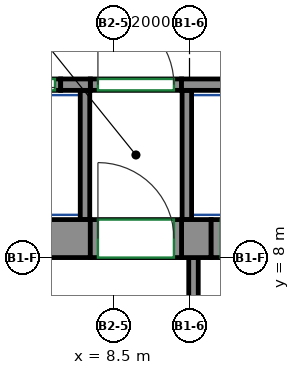
"""IFC4 building model, lengths in metres.
Left out: names, types, materials, properties, quantities, classifications, styles, units other than length and angle.
Written with IfcOpenShell. Run it as: python <this file> out.ifc"""

import sys

from ifc_helpers import new_model, si_unit, direction, frame, frame_2d, origin, place, context, subcontext, project, spatial, rectangle, extrude, source, transform, mapped, element, fill, save


model = new_model("IFC4")
c1 = context("Model", 3, precision=1e-05, world=origin(), true_north=direction((0.0, 1.0)))
c2 = subcontext(c1, "Body", "Model", "MODEL_VIEW")
j1 = project(units=[si_unit("LENGTHUNIT", "METRE"), si_unit("PLANEANGLEUNIT", "RADIAN")], contexts=[c1])
p1 = place(None, origin())
s1 = spatial("IfcSite", under=j1, at=p1, CompositionType="ELEMENT")
p2 = place(p1, origin())
s2 = spatial("IfcBuilding", under=s1, at=p2, CompositionType="ELEMENT")
p3 = place(p2, frame((0.0, 0.0, 51.0)))
s3 = spatial("IfcBuildingStorey", under=s2, at=p3, CompositionType="ELEMENT", Elevation=51.0)
m1 = source(origin(), c2, "Body", "SweptSolid", [
    extrude(rectangle(XDim=14.18, YDim=1.0, at=frame_2d((7.09, 0.0))), origin(), (0.0, 0.0, 1.0), 3.72),
])
p4 = place(p3, frame((-6.29, 8.5, 0.0), z_axis=(0.0, 0.0, 1.0), x_axis=(1.0, 0.0, 0.0)))
e1 = element("IfcWall", 1, at=p4, inside=s3, PredefinedType="SHEAR", context=c2, shape_type="MappedRepresentation", body=[
    mapped(m1, transform((0.0, 0.0, 0.0))),
])
m2 = source(origin(), c2, "Body", "SweptSolid", [
    extrude(rectangle(XDim=0.78, YDim=1.0, at=frame_2d((0.39, 0.0))), origin(), (0.0, 0.0, 1.0), 3.72),
])
p5 = place(p3, frame((10.29, 8.5, 0.0), z_axis=(0.0, 0.0, 1.0), x_axis=(1.0, 0.0, 0.0)))
e2 = element("IfcWall", 2, at=p5, inside=s3, PredefinedType="SHEAR", context=c2, shape_type="MappedRepresentation", body=[
    mapped(m2, transform((0.0, 0.0, 0.0))),
])
m3 = source(origin(), c2, "Body", "SweptSolid", [
    extrude(rectangle(XDim=0.78, YDim=0.3, at=frame_2d((0.39, 0.0))), origin(), (0.0, 0.0, 1.0), 3.72),
])
p6 = place(p3, frame((7.11, 12.55, 0.0), z_axis=(0.0, 0.0, 1.0), x_axis=(1.0, 0.0, 0.0)))
e3 = element("IfcWall", 3, at=p6, inside=s3, PredefinedType="SHEAR", context=c2, shape_type="MappedRepresentation", body=[
    mapped(m3, transform((0.0, 0.0, 0.0))),
])
m4 = source(origin(), c2, "Body", "SweptSolid", [
    extrude(rectangle(XDim=2.82, YDim=0.3, at=frame_2d((1.41, 0.0))), origin(), (0.0, 0.0, 1.0), 3.72),
])
p7 = place(p3, frame((10.29, 12.55, 0.0), z_axis=(0.0, 0.0, 1.0), x_axis=(1.0, 0.0, 0.0)))
e4 = element("IfcWall", 4, at=p7, inside=s3, PredefinedType="SHEAR", context=c2, shape_type="MappedRepresentation", body=[
    mapped(m4, transform((0.0, 0.0, 0.0))),
])
m5 = source(origin(), c2, "Body", "SweptSolid", [
    extrude(rectangle(XDim=1.4, YDim=0.3, at=frame_2d((0.7, 0.0))), origin(), (0.0, 0.0, 1.0), 3.72),
])
p8 = place(p3, frame((5.71, 12.55, 0.0), z_axis=(0.0, 0.0, 1.0), x_axis=(1.0, 0.0, 0.0)))
e5 = element("IfcWall", 5, at=p8, inside=s3, PredefinedType="PARTITIONING", context=c2, shape_type="MappedRepresentation", body=[
    mapped(m5, transform((0.0, 0.0, 0.0))),
])
p9 = place(p8, frame((0.15, 0.0, 0.0)))
e6 = element("IfcOpeningElement", 6, at=p9, cuts=e5, PredefinedType="OPENING", context=c2, shape_type="SweptSolid", body=[
    extrude(rectangle(XDim=1.1, YDim=2.1, at=frame_2d((0.55, 1.05))), frame((0.0, 0.16, 0.0), z_axis=(0.0, -1.0, 0.0), x_axis=(1.0, 0.0, 0.0)), (0.0, 0.0, 1.0), 0.32),
])
m6 = source(origin(), c2, "Body", "SweptSolid", [
    extrude(rectangle(XDim=2.4, YDim=0.3, at=frame_2d((1.2, 0.0))), origin(), (0.0, 0.0, 1.0), 3.72),
])
p10 = place(p3, frame((7.89, 12.55, 0.0), z_axis=(0.0, 0.0, 1.0), x_axis=(1.0, 0.0, 0.0)))
e7 = element("IfcWall", 7, at=p10, inside=s3, PredefinedType="PARTITIONING", context=c2, shape_type="MappedRepresentation", body=[
    mapped(m6, transform((0.0, 0.0, 0.0))),
])
p11 = place(p10, frame((0.2, 0.0, 0.0)))
e8 = element("IfcOpeningElement", 8, at=p11, cuts=e7, PredefinedType="OPENING", context=c2, shape_type="SweptSolid", body=[
    extrude(rectangle(XDim=2.0, YDim=2.1, at=frame_2d((1.0, 1.05))), frame((0.0, 0.16, 0.0), z_axis=(0.0, -1.0, 0.0), x_axis=(1.0, 0.0, 0.0)), (0.0, 0.0, 1.0), 0.32),
])
m7 = source(origin(), c2, "Body", "SweptSolid", [
    extrude(rectangle(XDim=2.65, YDim=0.25, at=frame_2d((1.325, 0.0))), origin(), (0.0, 0.0, 1.0), 3.72),
])
p12 = place(p3, frame((10.605, 5.35, 0.0), z_axis=(0.0, 0.0, 1.0), x_axis=(0.0, 1.0, 0.0)))
e9 = element("IfcWall", 9, at=p12, inside=s3, PredefinedType="PARTITIONING", context=c2, shape_type="MappedRepresentation", body=[
    mapped(m7, transform((0.0, 0.0, 0.0))),
])
m8 = source(origin(), c2, "Body", "SweptSolid", [
    extrude(rectangle(XDim=3.4, YDim=0.25, at=frame_2d((1.7, 0.0))), origin(), (0.0, 0.0, 1.0), 3.72),
])
for number, where, z_axis, x_axis in (
    (10, (10.43, 9.0, 0.0), (0.0, 0.0, 1.0), (0.0, 1.0, 0.0)),
    (11, (7.75, 9.0, 0.0), (0.0, 0.0, 1.0), (0.0, 1.0, 0.0)),
):
    element("IfcWall", number, at=place(p3, frame(where, z_axis=z_axis, x_axis=x_axis)), inside=s3, PredefinedType="PARTITIONING", context=c2, shape_type="MappedRepresentation", body=[
        mapped(m8, transform((0.0, 0.0, 0.0))),
    ])
m9 = source(origin(), c2, "Body", "SweptSolid", [
    extrude(rectangle(XDim=2.4, YDim=1.0, at=frame_2d((1.2, 0.0))), origin(), (0.0, 0.0, 1.0), 2.7),
])
p13 = place(p3, frame((7.89, 8.5, 0.0), z_axis=(0.0, 0.0, 1.0), x_axis=(1.0, 0.0, 0.0)))
e12 = element("IfcWall", 12, at=p13, inside=s3, PredefinedType="PARTITIONING", context=c2, shape_type="MappedRepresentation", body=[
    mapped(m9, transform((0.0, 0.0, 0.0))),
])
p14 = place(p13, frame((0.2, 0.0, 0.0)))
e13 = element("IfcOpeningElement", 13, at=p14, cuts=e12, PredefinedType="OPENING", context=c2, shape_type="SweptSolid", body=[
    extrude(rectangle(XDim=2.0, YDim=2.1, at=frame_2d((1.0, 1.05))), frame((0.0, 0.51, 0.0), z_axis=(0.0, -1.0, 0.0), x_axis=(1.0, 0.0, 0.0)), (0.0, 0.0, 1.0), 1.02),
])
m10 = source(origin(), c2, "Body", "SweptSolid", [
    extrude(rectangle(XDim=1.4, YDim=1.0, at=frame_2d((0.7, 0.0))), origin(), (0.0, 0.0, 1.0), 2.7),
])
p15 = place(p3, frame((11.07, 8.5, 0.0), z_axis=(0.0, 0.0, 1.0), x_axis=(1.0, 0.0, 0.0)))
e14 = element("IfcWall", 14, at=p15, inside=s3, PredefinedType="PARTITIONING", context=c2, shape_type="MappedRepresentation", body=[
    mapped(m10, transform((0.0, 0.0, 0.0))),
])
p16 = place(p15, frame((0.25, 0.0, 0.0)))
e15 = element("IfcOpeningElement", 15, at=p16, cuts=e14, PredefinedType="OPENING", context=c2, shape_type="SweptSolid", body=[
    extrude(rectangle(XDim=0.9, YDim=2.1, at=frame_2d((0.45, 1.05))), frame((0.0, 0.51, 0.0), z_axis=(0.0, -1.0, 0.0), x_axis=(1.0, 0.0, 0.0)), (0.0, 0.0, 1.0), 1.02),
])
p17 = place(p11, origin())
e16 = element("IfcDoor", 16, at=p17, inside=s3, OperationType="DOUBLE_DOOR_SINGLE_SWING", PredefinedType="DOOR", context=c2, shape_type="SweptSolid", body=[
    extrude(rectangle(XDim=2.0, YDim=2.1, at=frame_2d((1.0, 1.05))), frame((0.0, 0.025, 0.0), z_axis=(0.0, -1.0, 0.0), x_axis=(1.0, 0.0, 0.0)), (0.0, 0.0, 1.0), 0.05),
])
fill(e8, e16)
p18 = place(p14, origin())
e17 = element("IfcDoor", 17, at=p18, inside=s3, OperationType="DOUBLE_DOOR_SINGLE_SWING", PredefinedType="DOOR", context=c2, shape_type="SweptSolid", body=[
    extrude(rectangle(XDim=2.0, YDim=2.1, at=frame_2d((1.0, 1.05))), frame((0.0, 0.405, 0.0), z_axis=(0.0, -1.0, 0.0), x_axis=(1.0, 0.0, 0.0)), (0.0, 0.0, 1.0), 0.05),
])
fill(e13, e17)
p19 = place(p9, origin())
e18 = element("IfcDoor", 18, at=p19, inside=s3, OperationType="DOUBLE_DOOR_SLIDING", PredefinedType="DOOR", context=c2, shape_type="SweptSolid", body=[
    extrude(rectangle(XDim=1.1, YDim=2.1, at=frame_2d((0.55, 1.05))), frame((0.0, 0.025, 0.0), z_axis=(0.0, -1.0, 0.0), x_axis=(1.0, 0.0, 0.0)), (0.0, 0.0, 1.0), 0.05),
])
fill(e6, e18)
save(model, sys.argv[1])
